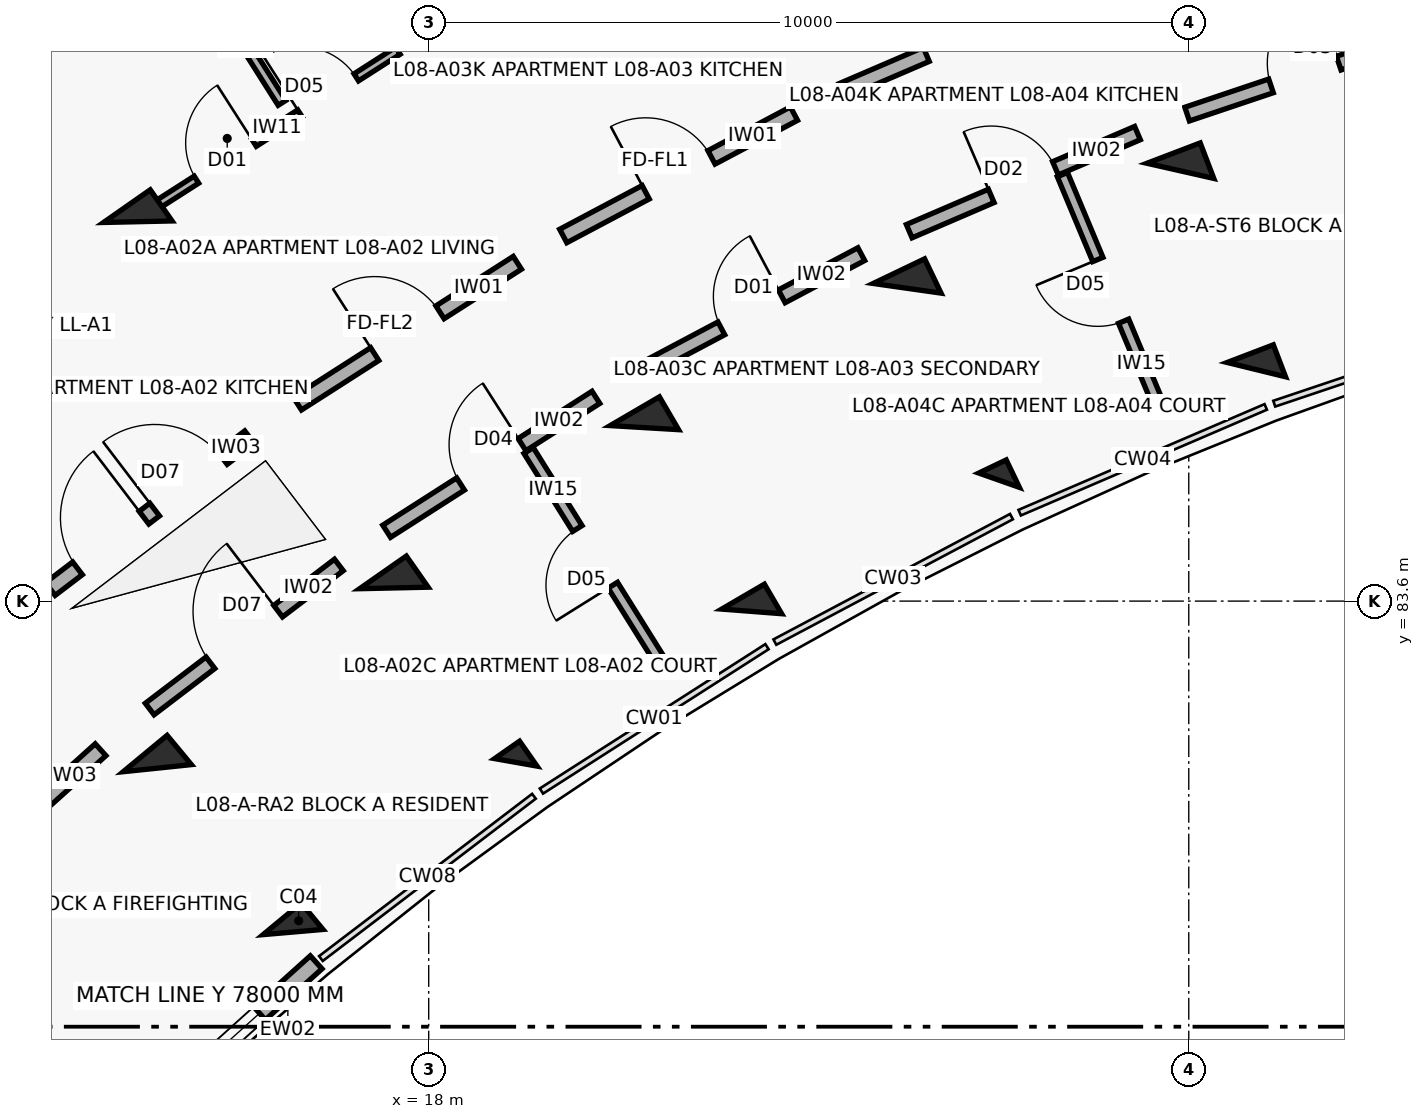
"""IFC4 building model, lengths in metres.
Left out: names, types, materials, properties, quantities, classifications, styles, units other than length and angle.
Written with IfcOpenShell. Run it as: python <this file> out.ifc"""

import sys

from ifc_helpers import new_model, si_unit, direction, frame, frame_2d, origin, origin_2d, place, context, subcontext, project, spatial, rectangle, extrude, element, fill, save


model = new_model("IFC4")
c1 = context("Model", 3, precision=1e-05, world=origin(), true_north=direction((0.0, 1.0)))
c2 = subcontext(c1, "Body", "Model", "MODEL_VIEW")
j1 = project(units=[si_unit("LENGTHUNIT", "METRE"), si_unit("PLANEANGLEUNIT", "RADIAN")], contexts=[c1])
p1 = place(None, origin())
s1 = spatial("IfcSite", under=j1, at=p1, CompositionType="ELEMENT")
p2 = place(p1, origin())
s2 = spatial("IfcBuilding", under=s1, at=p2, CompositionType="ELEMENT")
p3 = place(p2, frame((0.0, 0.0, 26.7)))
s3 = spatial("IfcBuildingStorey", under=s2, at=p3, CompositionType="ELEMENT", Elevation=26.7)
p4 = place(p3, frame((16.215, 79.245, 0.0), z_axis=(0.0, 0.0, 1.0), x_axis=(-0.637961754089, 0.770068049148, 0.0)))
e1 = element("IfcColumn", 1, at=p4, inside=s3, PredefinedType="COLUMN", context=c2, shape_type="SweptSolid", body=[
    extrude(rectangle(XDim=0.45, YDim=0.65, at=origin_2d()), origin(), (0.0, 0.0, 1.0), 3.1),
])
p5 = place(p3, frame((14.429, 81.402, 0.0), z_axis=(0.0, 0.0, 1.0), x_axis=(-0.637961754089, 0.770068049148, 0.0)))
e2 = element("IfcColumn", 2, at=p5, inside=s3, PredefinedType="COLUMN", context=c2, shape_type="SweptSolid", body=[
    extrude(rectangle(XDim=0.5, YDim=0.75, at=origin_2d()), origin(), (0.0, 0.0, 1.0), 3.1),
])
p6 = place(p3, frame((19.146, 81.478, 0.0), z_axis=(0.0, 0.0, 1.0), x_axis=(-0.573004420611, 0.819552276527, 0.0)))
e3 = element("IfcColumn", 3, at=p6, inside=s3, PredefinedType="COLUMN", context=c2, shape_type="SweptSolid", body=[
    extrude(rectangle(XDim=0.4, YDim=0.4, at=origin_2d()), origin(), (0.0, 0.0, 1.0), 3.1),
])
for number, where, z_axis, x_axis in (
    (4, (17.542, 83.773, 0.0), (0.0, 0.0, 1.0), (-0.573, 0.82, 0.0)),
    (5, (14.172, 88.592, 0.0), (0.0, 0.0, 1.0), (-0.573, 0.82, 0.0)),
):
    element("IfcColumn", number, at=place(p3, frame(where, z_axis=z_axis, x_axis=x_axis)), inside=s3, PredefinedType="COLUMN", context=c2, shape_type="SweptSolid", body=[
        extrude(rectangle(XDim=0.5, YDim=0.75, at=origin_2d()), origin(), (0.0, 0.0, 1.0), 3.1),
    ])
p7 = place(p3, frame((22.249, 83.464, 0.0), z_axis=(0.0, 0.0, 1.0), x_axis=(-0.504226211181, 0.863571611366, 0.0)))
e6 = element("IfcColumn", 6, at=p7, inside=s3, PredefinedType="COLUMN", context=c2, shape_type="SweptSolid", body=[
    extrude(rectangle(XDim=0.45, YDim=0.65, at=origin_2d()), origin(), (0.0, 0.0, 1.0), 3.1),
])
for number, where, z_axis, x_axis in (
    (7, (20.837, 85.882, 0.0), (0.0, 0.0, 1.0), (-0.504, 0.864, 0.0)),
    (8, (17.873, 90.96, 0.0), (0.0, 0.0, 1.0), (-0.504, 0.864, 0.0)),
):
    element("IfcColumn", number, at=place(p3, frame(where, z_axis=z_axis, x_axis=x_axis)), inside=s3, PredefinedType="COLUMN", context=c2, shape_type="SweptSolid", body=[
        extrude(rectangle(XDim=0.5, YDim=0.75, at=origin_2d()), origin(), (0.0, 0.0, 1.0), 3.1),
    ])
p8 = place(p3, frame((25.504, 85.191, 0.0), z_axis=(0.0, 0.0, 1.0), x_axis=(-0.432085748802, 0.901832526405, 0.0)))
e9 = element("IfcColumn", 9, at=p8, inside=s3, PredefinedType="COLUMN", context=c2, shape_type="SweptSolid", body=[
    extrude(rectangle(XDim=0.4, YDim=0.4, at=origin_2d()), origin(), (0.0, 0.0, 1.0), 3.1),
])
p9 = place(p3, frame((24.294, 87.716, 0.0), z_axis=(0.0, 0.0, 1.0), x_axis=(-0.432085748802, 0.901832526405, 0.0)))
e10 = element("IfcColumn", 10, at=p9, inside=s3, PredefinedType="COLUMN", context=c2, shape_type="SweptSolid", body=[
    extrude(rectangle(XDim=0.5, YDim=0.75, at=origin_2d()), origin(), (0.0, 0.0, 1.0), 3.1),
])
p10 = place(p3, frame((28.889, 86.646, 0.0), z_axis=(0.0, 0.0, 1.0), x_axis=(-0.357064076459, 0.934079892355, 0.0)))
e11 = element("IfcColumn", 11, at=p10, inside=s3, PredefinedType="COLUMN", context=c2, shape_type="SweptSolid", body=[
    extrude(rectangle(XDim=0.45, YDim=0.65, at=origin_2d()), origin(), (0.0, 0.0, 1.0), 3.1),
])
p11 = place(p3, frame((27.889, 89.261, 0.0), z_axis=(0.0, 0.0, 1.0), x_axis=(-0.357064076459, 0.934079892355, 0.0)))
e12 = element("IfcColumn", 12, at=p11, inside=s3, PredefinedType="COLUMN", context=c2, shape_type="SweptSolid", body=[
    extrude(rectangle(XDim=0.5, YDim=0.75, at=origin_2d()), origin(), (0.0, 0.0, 1.0), 3.1),
])
p12 = place(p3, frame((13.84, 76.437, 0.0), z_axis=(0.0, 0.0, 1.0), x_axis=(0.743385092197, 0.668863666751, 0.0)))
e13 = element("IfcWall", 13, at=p12, inside=s3, PredefinedType="SOLIDWALL", context=c2, shape_type="SweptSolid", body=[
    extrude(rectangle(XDim=3.604, YDim=0.23, at=frame_2d((1.802, 0.0))), origin(), (0.0, 0.0, 1.0), 2.25),
])
p13 = place(p12, frame((1.002, 0.0, 0.32)))
e14 = element("IfcOpeningElement", 14, at=p13, cuts=e13, PredefinedType="OPENING", context=c2, shape_type="SweptSolid", body=[
    extrude(rectangle(XDim=1.6, YDim=1.5, at=frame_2d((0.8, 0.75))), frame((0.0, 0.125, 0.0), z_axis=(0.0, -1.0, 0.0), x_axis=(1.0, 0.0, 0.0)), (0.0, 0.0, 1.0), 0.25),
])
p14 = place(p3, frame((11.357, 79.552, 0.0), z_axis=(0.0, 0.0, 1.0), x_axis=(0.743387266925, 0.668861249718, 0.0)))
e15 = element("IfcWall", 15, at=p14, inside=s3, PredefinedType="SOLIDWALL", context=c2, shape_type="SweptSolid", body=[
    extrude(rectangle(XDim=3.128, YDim=0.21, at=frame_2d((1.564, 0.0))), origin(), (0.0, 0.0, 1.0), 2.08),
])
p15 = place(p14, frame((1.014, 0.0, 0.0)))
e16 = element("IfcOpeningElement", 16, at=p15, cuts=e15, PredefinedType="OPENING", context=c2, shape_type="SweptSolid", body=[
    extrude(rectangle(XDim=1.1, YDim=2.15, at=frame_2d((0.55, 1.075))), frame((0.0, 0.115, 0.0), z_axis=(0.0, -1.0, 0.0), x_axis=(1.0, 0.0, 0.0)), (0.0, 0.0, 1.0), 0.23),
])
p16 = place(p3, frame((13.021, 83.759, 0.0), z_axis=(0.0, 0.0, 1.0), x_axis=(0.795498026433, 0.605956178235, 0.0)))
e17 = element("IfcWall", 17, at=p16, inside=s3, PredefinedType="SOLIDWALL", context=c2, shape_type="SweptSolid", body=[
    extrude(rectangle(XDim=3.296, YDim=0.21, at=frame_2d((1.648, 0.0))), origin(), (0.0, 0.0, 1.0), 2.08),
])
p17 = place(p16, frame((0.45, 0.0, 0.0)))
e18 = element("IfcOpeningElement", 18, at=p17, cuts=e17, PredefinedType="OPENING", context=c2, shape_type="SweptSolid", body=[
    extrude(rectangle(XDim=1.1, YDim=2.15, at=frame_2d((0.55, 1.075))), frame((0.0, 0.115, 0.0), z_axis=(0.0, -1.0, 0.0), x_axis=(1.0, 0.0, 0.0)), (0.0, 0.0, 1.0), 0.23),
])
p18 = place(p16, frame((1.726, 0.0, 0.0)))
e19 = element("IfcOpeningElement", 19, at=p18, cuts=e17, PredefinedType="OPENING", context=c2, shape_type="SweptSolid", body=[
    extrude(rectangle(XDim=1.12, YDim=2.15, at=frame_2d((0.56, 1.075))), frame((0.0, 0.115, 0.0), z_axis=(0.0, -1.0, 0.0), x_axis=(1.0, 0.0, 0.0)), (0.0, 0.0, 1.0), 0.23),
])
p19 = place(p3, frame((14.329, 82.18, 0.0), z_axis=(0.0, 0.0, 1.0), x_axis=(0.795501577908, 0.605951515838, 0.0)))
e20 = element("IfcWall", 20, at=p19, inside=s3, PredefinedType="SOLIDWALL", context=c2, shape_type="SweptSolid", body=[
    extrude(rectangle(XDim=3.129, YDim=0.19, at=frame_2d((1.564, 0.0))), origin(), (0.0, 0.0, 1.0), 2.08),
])
p20 = place(p19, frame((1.004, 0.0, 0.0)))
e21 = element("IfcOpeningElement", 21, at=p20, cuts=e20, PredefinedType="OPENING", context=c2, shape_type="SweptSolid", body=[
    extrude(rectangle(XDim=1.12, YDim=2.15, at=frame_2d((0.56, 1.075))), frame((0.0, 0.105, 0.0), z_axis=(0.0, -1.0, 0.0), x_axis=(1.0, 0.0, 0.0)), (0.0, 0.0, 1.0), 0.21),
])
p21 = place(p3, frame((16.272, 86.199, 0.0), z_axis=(0.0, 0.0, 1.0), x_axis=(0.842257205985, 0.539075874963, 0.0)))
e22 = element("IfcWall", 22, at=p21, inside=s3, PredefinedType="SOLIDWALL", context=c2, shape_type="SweptSolid", body=[
    extrude(rectangle(XDim=3.436, YDim=0.2, at=frame_2d((1.718, 0.0))), origin(), (0.0, 0.0, 1.0), 2.08),
])
p22 = place(p21, frame((1.208, 0.0, 0.0)))
e23 = element("IfcOpeningElement", 23, at=p22, cuts=e22, PredefinedType="OPENING", context=c2, shape_type="SweptSolid", body=[
    extrude(rectangle(XDim=1.02, YDim=2.15, at=frame_2d((0.51, 1.075))), frame((0.0, 0.11, 0.0), z_axis=(0.0, -1.0, 0.0), x_axis=(1.0, 0.0, 0.0)), (0.0, 0.0, 1.0), 0.22),
])
p23 = place(p3, frame((17.447, 84.519, 0.0), z_axis=(0.0, 0.0, 1.0), x_axis=(0.842225276846, 0.539125758095, 0.0)))
e24 = element("IfcWall", 24, at=p23, inside=s3, PredefinedType="SOLIDWALL", context=c2, shape_type="SweptSolid", body=[
    extrude(rectangle(XDim=3.269, YDim=0.19, at=frame_2d((1.634, 0.0))), origin(), (0.0, 0.0, 1.0), 2.08),
])
p24 = place(p23, frame((1.154, 0.0, 0.0)))
e25 = element("IfcOpeningElement", 25, at=p24, cuts=e24, PredefinedType="OPENING", context=c2, shape_type="SweptSolid", body=[
    extrude(rectangle(XDim=0.96, YDim=2.1, at=frame_2d((0.48, 1.05))), frame((0.0, 0.105, 0.0), z_axis=(0.0, -1.0, 0.0), x_axis=(1.0, 0.0, 0.0)), (0.0, 0.0, 1.0), 0.21),
])
p25 = place(p3, frame((21.064, 82.783, 0.0), z_axis=(0.0, 0.0, 1.0), x_axis=(-0.53015188203, 0.847902696057, 0.0)))
e26 = element("IfcWall", 26, at=p25, inside=s3, PredefinedType="PARTITIONING", context=c2, shape_type="SweptSolid", body=[
    extrude(rectangle(XDim=3.3, YDim=0.145, at=frame_2d((1.65, 0.0))), origin(), (0.0, 0.0, 1.0), 2.08),
])
p26 = place(p25, frame((1.21, 0.0, 0.0)))
e27 = element("IfcOpeningElement", 27, at=p26, cuts=e26, PredefinedType="OPENING", context=c2, shape_type="SweptSolid", body=[
    extrude(rectangle(XDim=0.88, YDim=2.1, at=frame_2d((0.44, 1.05))), frame((0.0, 0.083, 0.0), z_axis=(0.0, -1.0, 0.0), x_axis=(1.0, 0.0, 0.0)), (0.0, 0.0, 1.0), 0.165),
])
p27 = place(p3, frame((14.396, 88.795, 0.0), z_axis=(0.0, 0.0, 1.0), x_axis=(0.842271400662, 0.539053696423, 0.0)))
e28 = element("IfcWall", 28, at=p27, inside=s3, PredefinedType="PARTITIONING", context=c2, shape_type="SweptSolid", body=[
    extrude(rectangle(XDim=3.797, YDim=0.11, at=frame_2d((1.898, 0.0))), origin(), (0.0, 0.0, 1.0), 2.08),
])
p28 = place(p27, frame((0.65, 0.0, 0.0)))
e29 = element("IfcOpeningElement", 29, at=p28, cuts=e28, PredefinedType="OPENING", context=c2, shape_type="SweptSolid", body=[
    extrude(rectangle(XDim=0.9, YDim=2.1, at=frame_2d((0.45, 1.05))), frame((0.0, 0.065, 0.0), z_axis=(0.0, -1.0, 0.0), x_axis=(1.0, 0.0, 0.0)), (0.0, 0.0, 1.0), 0.13),
])
p29 = place(p27, frame((2.267, 0.0, 0.0)))
e30 = element("IfcOpeningElement", 30, at=p29, cuts=e28, PredefinedType="OPENING", context=c2, shape_type="SweptSolid", body=[
    extrude(rectangle(XDim=0.88, YDim=2.1, at=frame_2d((0.44, 1.05))), frame((0.0, 0.065, 0.0), z_axis=(0.0, -1.0, 0.0), x_axis=(1.0, 0.0, 0.0)), (0.0, 0.0, 1.0), 0.13),
])
p30 = place(p3, frame((16.07, 90.156, 0.0), z_axis=(0.0, 0.0, 1.0), x_axis=(-0.535268985628, 0.84468166372, 0.0)))
e31 = element("IfcWall", 31, at=p30, inside=s3, PredefinedType="PARTITIONING", context=c2, shape_type="SweptSolid", body=[
    extrude(rectangle(XDim=4.9, YDim=0.12, at=frame_2d((2.45, 0.0))), origin(), (0.0, 0.0, 1.0), 2.08),
])
p31 = place(p30, frame((1.8, 0.0, 0.0)))
e32 = element("IfcOpeningElement", 32, at=p31, cuts=e31, PredefinedType="OPENING", context=c2, shape_type="SweptSolid", body=[
    extrude(rectangle(XDim=1.3, YDim=2.1, at=frame_2d((0.65, 1.05))), frame((0.0, 0.07, 0.0), z_axis=(0.0, -1.0, 0.0), x_axis=(1.0, 0.0, 0.0)), (0.0, 0.0, 1.0), 0.14),
])
p32 = place(p3, frame((19.77, 88.404, 0.0), z_axis=(0.0, 0.0, 1.0), x_axis=(0.883410853063, 0.468599258099, 0.0)))
e33 = element("IfcWall", 33, at=p32, inside=s3, PredefinedType="SOLIDWALL", context=c2, shape_type="SweptSolid", body=[
    extrude(rectangle(XDim=3.436, YDim=0.2, at=frame_2d((1.718, 0.0))), origin(), (0.0, 0.0, 1.0), 2.08),
])
p33 = place(p32, frame((1.228, 0.0, 0.0)))
e34 = element("IfcOpeningElement", 34, at=p33, cuts=e33, PredefinedType="OPENING", context=c2, shape_type="SweptSolid", body=[
    extrude(rectangle(XDim=0.98, YDim=2.15, at=frame_2d((0.49, 1.075))), frame((0.0, 0.11, 0.0), z_axis=(0.0, -1.0, 0.0), x_axis=(1.0, 0.0, 0.0)), (0.0, 0.0, 1.0), 0.22),
])
p34 = place(p3, frame((20.804, 86.634, 0.0), z_axis=(0.0, 0.0, 1.0), x_axis=(0.883444301944, 0.468536194293, 0.0)))
e35 = element("IfcWall", 35, at=p34, inside=s3, PredefinedType="SOLIDWALL", context=c2, shape_type="SweptSolid", body=[
    extrude(rectangle(XDim=3.269, YDim=0.19, at=frame_2d((1.634, 0.0))), origin(), (0.0, 0.0, 1.0), 2.08),
])
p35 = place(p34, frame((1.184, 0.0, 0.0)))
e36 = element("IfcOpeningElement", 36, at=p35, cuts=e35, PredefinedType="OPENING", context=c2, shape_type="SweptSolid", body=[
    extrude(rectangle(XDim=0.9, YDim=2.1, at=frame_2d((0.45, 1.05))), frame((0.0, 0.105, 0.0), z_axis=(0.0, -1.0, 0.0), x_axis=(1.0, 0.0, 0.0)), (0.0, 0.0, 1.0), 0.21),
])
p36 = place(p3, frame((23.437, 90.316, 0.0), z_axis=(0.0, 0.0, 1.0), x_axis=(0.918718172399, 0.394913813008, 0.0)))
e37 = element("IfcWall", 37, at=p36, inside=s3, PredefinedType="SOLIDWALL", context=c2, shape_type="SweptSolid", body=[
    extrude(rectangle(XDim=3.436, YDim=0.2, at=frame_2d((1.718, 0.0))), origin(), (0.0, 0.0, 1.0), 2.08),
])
p37 = place(p36, frame((1.208, 0.0, 0.0)))
e38 = element("IfcOpeningElement", 38, at=p37, cuts=e37, PredefinedType="OPENING", context=c2, shape_type="SweptSolid", body=[
    extrude(rectangle(XDim=1.02, YDim=2.15, at=frame_2d((0.51, 1.075))), frame((0.0, 0.11, 0.0), z_axis=(0.0, -1.0, 0.0), x_axis=(1.0, 0.0, 0.0)), (0.0, 0.0, 1.0), 0.22),
])
p38 = place(p3, frame((24.322, 88.467, 0.0), z_axis=(0.0, 0.0, 1.0), x_axis=(0.918723391052, 0.394901672235, 0.0)))
e39 = element("IfcWall", 39, at=p38, inside=s3, PredefinedType="SOLIDWALL", context=c2, shape_type="SweptSolid", body=[
    extrude(rectangle(XDim=3.269, YDim=0.19, at=frame_2d((1.634, 0.0))), origin(), (0.0, 0.0, 1.0), 2.08),
])
p39 = place(p38, frame((1.174, 0.0, 0.0)))
e40 = element("IfcOpeningElement", 40, at=p39, cuts=e39, PredefinedType="OPENING", context=c2, shape_type="SweptSolid", body=[
    extrude(rectangle(XDim=0.92, YDim=2.1, at=frame_2d((0.46, 1.05))), frame((0.0, 0.105, 0.0), z_axis=(0.0, -1.0, 0.0), x_axis=(1.0, 0.0, 0.0)), (0.0, 0.0, 1.0), 0.21),
])
p40 = place(p3, frame((27.609, 86.166, 0.0), z_axis=(0.0, 0.0, 1.0), x_axis=(-0.385151143297, 0.922853507777, 0.0)))
e41 = element("IfcWall", 41, at=p40, inside=s3, PredefinedType="PARTITIONING", context=c2, shape_type="SweptSolid", body=[
    extrude(rectangle(XDim=3.3, YDim=0.145, at=frame_2d((1.65, 0.0))), origin(), (0.0, 0.0, 1.0), 2.08),
])
p41 = place(p40, frame((1.21, 0.0, 0.0)))
e42 = element("IfcOpeningElement", 42, at=p41, cuts=e41, PredefinedType="OPENING", context=c2, shape_type="SweptSolid", body=[
    extrude(rectangle(XDim=0.88, YDim=2.1, at=frame_2d((0.44, 1.05))), frame((0.0, 0.083, 0.0), z_axis=(0.0, -1.0, 0.0), x_axis=(1.0, 0.0, 0.0)), (0.0, 0.0, 1.0), 0.165),
])
p42 = place(p3, frame((27.979, 90.008, 0.0), z_axis=(0.0, 0.0, 1.0), x_axis=(0.94787351033, 0.318646839643, 0.0)))
e43 = element("IfcWall", 43, at=p42, inside=s3, PredefinedType="SOLIDWALL", context=c2, shape_type="SweptSolid", body=[
    extrude(rectangle(XDim=3.269, YDim=0.19, at=frame_2d((1.634, 0.0))), origin(), (0.0, 0.0, 1.0), 2.08),
])
p43 = place(p42, frame((1.164, 0.0, 0.0)))
e44 = element("IfcOpeningElement", 44, at=p43, cuts=e43, PredefinedType="OPENING", context=c2, shape_type="SweptSolid", body=[
    extrude(rectangle(XDim=0.94, YDim=2.1, at=frame_2d((0.47, 1.05))), frame((0.0, 0.105, 0.0), z_axis=(0.0, -1.0, 0.0), x_axis=(1.0, 0.0, 0.0)), (0.0, 0.0, 1.0), 0.21),
])
p44 = place(p13, origin())
e45 = element("IfcWindow", 45, at=p44, inside=s3, PartitioningType="DOUBLE_PANEL_VERTICAL", PredefinedType="WINDOW", context=c2, shape_type="SweptSolid", body=[
    extrude(rectangle(XDim=1.6, YDim=1.5, at=frame_2d((0.8, 0.75))), frame((0.0, 0.03, 0.0), z_axis=(0.0, -1.0, 0.0), x_axis=(1.0, 0.0, 0.0)), (0.0, 0.0, 1.0), 0.06),
])
fill(e14, e45)
p45 = place(p17, origin())
e46 = element("IfcDoor", 46, at=p45, inside=s3, OperationType="SINGLE_SWING_RIGHT", PredefinedType="DOOR", context=c2, shape_type="SweptSolid", body=[
    extrude(rectangle(XDim=1.1, YDim=2.15, at=frame_2d((0.55, 1.075))), frame((0.0, 0.025, 0.0), z_axis=(0.0, -1.0, 0.0), x_axis=(1.0, 0.0, 0.0)), (0.0, 0.0, 1.0), 0.05),
])
fill(e18, e46)
p46 = place(p18, origin())
e47 = element("IfcDoor", 47, at=p46, inside=s3, OperationType="SINGLE_SWING_LEFT", PredefinedType="DOOR", context=c2, shape_type="SweptSolid", body=[
    extrude(rectangle(XDim=1.12, YDim=2.15, at=frame_2d((0.56, 1.075))), frame((0.0, 0.025, 0.0), z_axis=(0.0, -1.0, 0.0), x_axis=(1.0, 0.0, 0.0)), (0.0, 0.0, 1.0), 0.05),
])
fill(e19, e47)
p47 = place(p20, origin())
e48 = element("IfcDoor", 48, at=p47, inside=s3, OperationType="SINGLE_SWING_RIGHT", PredefinedType="DOOR", context=c2, shape_type="SweptSolid", body=[
    extrude(rectangle(XDim=1.12, YDim=2.15, at=frame_2d((0.56, 1.075))), frame((0.0, 0.025, 0.0), z_axis=(0.0, -1.0, 0.0), x_axis=(1.0, 0.0, 0.0)), (0.0, 0.0, 1.0), 0.05),
])
fill(e21, e48)
p48 = place(p22, origin())
e49 = element("IfcDoor", 49, at=p48, inside=s3, OperationType="SINGLE_SWING_LEFT", PredefinedType="DOOR", context=c2, shape_type="SweptSolid", body=[
    extrude(rectangle(XDim=1.02, YDim=2.15, at=frame_2d((0.51, 1.075))), frame((0.0, 0.025, 0.0), z_axis=(0.0, -1.0, 0.0), x_axis=(1.0, 0.0, 0.0)), (0.0, 0.0, 1.0), 0.05),
])
fill(e23, e49)
p49 = place(p24, origin())
e50 = element("IfcDoor", 50, at=p49, inside=s3, OperationType="SINGLE_SWING_RIGHT", PredefinedType="DOOR", context=c2, shape_type="SweptSolid", body=[
    extrude(rectangle(XDim=0.96, YDim=2.1, at=frame_2d((0.48, 1.05))), frame((0.0, 0.025, 0.0), z_axis=(0.0, -1.0, 0.0), x_axis=(1.0, 0.0, 0.0)), (0.0, 0.0, 1.0), 0.05),
])
fill(e25, e50)
p50 = place(p26, origin())
e51 = element("IfcDoor", 51, at=p50, inside=s3, OperationType="SINGLE_SWING_LEFT", PredefinedType="DOOR", context=c2, shape_type="SweptSolid", body=[
    extrude(rectangle(XDim=0.88, YDim=2.1, at=frame_2d((0.44, 1.05))), frame((0.0, 0.025, 0.0), z_axis=(0.0, -1.0, 0.0), x_axis=(1.0, 0.0, 0.0)), (0.0, 0.0, 1.0), 0.05),
])
fill(e27, e51)
p51 = place(p28, origin())
e52 = element("IfcDoor", 52, at=p51, inside=s3, OperationType="SINGLE_SWING_RIGHT", PredefinedType="DOOR", context=c2, shape_type="SweptSolid", body=[
    extrude(rectangle(XDim=0.9, YDim=2.1, at=frame_2d((0.45, 1.05))), frame((0.0, 0.025, 0.0), z_axis=(0.0, -1.0, 0.0), x_axis=(1.0, 0.0, 0.0)), (0.0, 0.0, 1.0), 0.05),
])
fill(e29, e52)
p52 = place(p29, origin())
e53 = element("IfcDoor", 53, at=p52, inside=s3, OperationType="SINGLE_SWING_LEFT", PredefinedType="DOOR", context=c2, shape_type="SweptSolid", body=[
    extrude(rectangle(XDim=0.88, YDim=2.1, at=frame_2d((0.44, 1.05))), frame((0.0, 0.025, 0.0), z_axis=(0.0, -1.0, 0.0), x_axis=(1.0, 0.0, 0.0)), (0.0, 0.0, 1.0), 0.05),
])
fill(e30, e53)
p53 = place(p33, origin())
e54 = element("IfcDoor", 54, at=p53, inside=s3, OperationType="SINGLE_SWING_LEFT", PredefinedType="DOOR", context=c2, shape_type="SweptSolid", body=[
    extrude(rectangle(XDim=0.98, YDim=2.15, at=frame_2d((0.49, 1.075))), frame((0.0, 0.025, 0.0), z_axis=(0.0, -1.0, 0.0), x_axis=(1.0, 0.0, 0.0)), (0.0, 0.0, 1.0), 0.05),
])
fill(e34, e54)
p54 = place(p35, origin())
e55 = element("IfcDoor", 55, at=p54, inside=s3, OperationType="SINGLE_SWING_RIGHT", PredefinedType="DOOR", context=c2, shape_type="SweptSolid", body=[
    extrude(rectangle(XDim=0.9, YDim=2.1, at=frame_2d((0.45, 1.05))), frame((0.0, 0.025, 0.0), z_axis=(0.0, -1.0, 0.0), x_axis=(1.0, 0.0, 0.0)), (0.0, 0.0, 1.0), 0.05),
])
fill(e36, e55)
p55 = place(p37, origin())
e56 = element("IfcDoor", 56, at=p55, inside=s3, OperationType="SINGLE_SWING_RIGHT", PredefinedType="DOOR", context=c2, shape_type="SweptSolid", body=[
    extrude(rectangle(XDim=1.02, YDim=2.15, at=frame_2d((0.51, 1.075))), frame((0.0, 0.025, 0.0), z_axis=(0.0, -1.0, 0.0), x_axis=(1.0, 0.0, 0.0)), (0.0, 0.0, 1.0), 0.05),
])
fill(e38, e56)
p56 = place(p39, origin())
e57 = element("IfcDoor", 57, at=p56, inside=s3, OperationType="SINGLE_SWING_LEFT", PredefinedType="DOOR", context=c2, shape_type="SweptSolid", body=[
    extrude(rectangle(XDim=0.92, YDim=2.1, at=frame_2d((0.46, 1.05))), frame((0.0, 0.025, 0.0), z_axis=(0.0, -1.0, 0.0), x_axis=(1.0, 0.0, 0.0)), (0.0, 0.0, 1.0), 0.05),
])
fill(e40, e57)
p57 = place(p41, origin())
e58 = element("IfcDoor", 58, at=p57, inside=s3, OperationType="SINGLE_SWING_RIGHT", PredefinedType="DOOR", context=c2, shape_type="SweptSolid", body=[
    extrude(rectangle(XDim=0.88, YDim=2.1, at=frame_2d((0.44, 1.05))), frame((0.0, 0.025, 0.0), z_axis=(0.0, -1.0, 0.0), x_axis=(1.0, 0.0, 0.0)), (0.0, 0.0, 1.0), 0.05),
])
fill(e42, e58)
p58 = place(p43, origin())
e59 = element("IfcDoor", 59, at=p58, inside=s3, OperationType="SINGLE_SWING_RIGHT", PredefinedType="DOOR", context=c2, shape_type="SweptSolid", body=[
    extrude(rectangle(XDim=0.94, YDim=2.1, at=frame_2d((0.47, 1.05))), frame((0.0, 0.025, 0.0), z_axis=(0.0, -1.0, 0.0), x_axis=(1.0, 0.0, 0.0)), (0.0, 0.0, 1.0), 0.05),
])
fill(e44, e59)
save(model, sys.argv[1])
